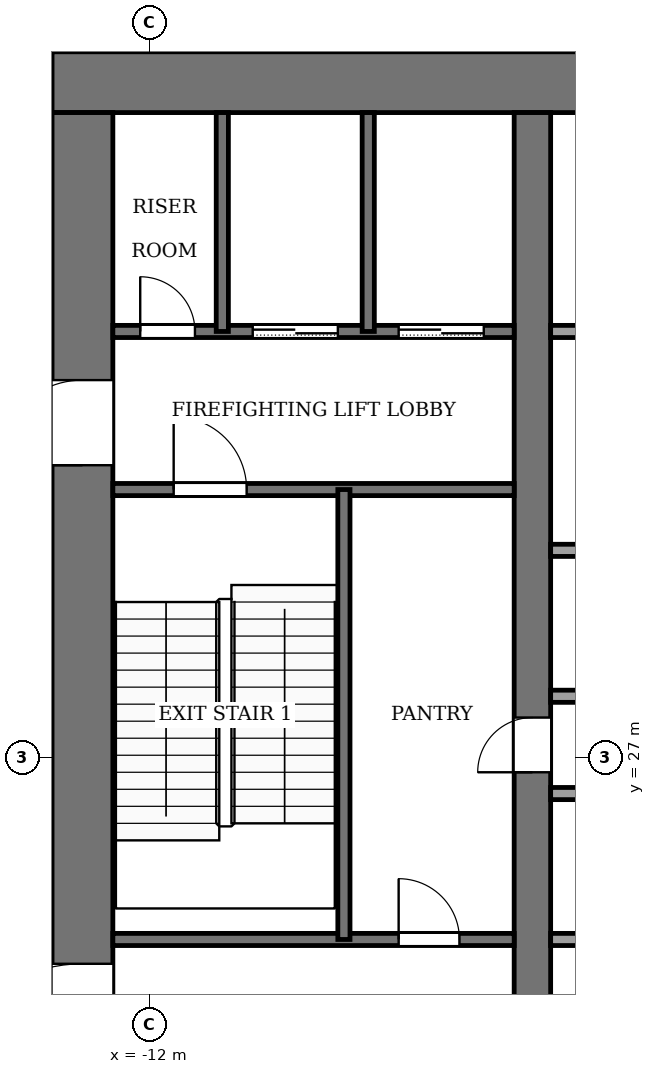
"""IFC4 building model, lengths in metres.
Left out: names, types, materials, properties, quantities, classifications, styles, units other than length and angle.
Written with IfcOpenShell. Run it as: python <this file> out.ifc"""

import sys

from ifc_helpers import new_model, si_unit, direction, frame, frame_2d, origin, place, context, subcontext, project, spatial, rectangle, extrude, element, fill, save


model = new_model("IFC4")
c1 = context("Model", 3, precision=1e-05, world=origin(), true_north=direction((0.0, 1.0)))
c2 = subcontext(c1, "Body", "Model", "MODEL_VIEW")
j1 = project(units=[si_unit("LENGTHUNIT", "METRE"), si_unit("PLANEANGLEUNIT", "RADIAN")], contexts=[c1])
p1 = place(None, origin())
s1 = spatial("IfcSite", under=j1, at=p1, CompositionType="ELEMENT")
p2 = place(p1, origin())
s2 = spatial("IfcBuilding", under=s1, at=p2, CompositionType="ELEMENT")
p3 = place(p2, frame((0.0, 0.0, 121.0)))
s3 = spatial("IfcBuildingStorey", under=s2, at=p3, CompositionType="ELEMENT", Elevation=121.0)
p4 = place(p3, frame((-13.6, 38.1, -0.13), z_axis=(0.0, 0.0, 1.0), x_axis=(1.0, 0.0, 0.0)))
e1 = element("IfcWall", 1, at=p4, inside=s3, PredefinedType="SHEAR", context=c2, shape_type="SweptSolid", body=[
    extrude(rectangle(XDim=27.2, YDim=1.0, at=frame_2d((13.6, 0.0))), origin(), (0.0, 0.0, 1.0), 5.0),
])
p5 = place(p3, frame((-13.1, 18.4, -0.13), z_axis=(0.0, 0.0, 1.0), x_axis=(0.0, 1.0, 0.0)))
e2 = element("IfcWall", 2, at=p5, inside=s3, PredefinedType="SHEAR", context=c2, shape_type="SweptSolid", body=[
    extrude(rectangle(XDim=19.2, YDim=1.0, at=frame_2d((9.6, 0.0))), origin(), (0.0, 0.0, 1.0), 5.0),
])
p6 = place(p5, frame((2.8, 0.0, 0.13)))
e3 = element("IfcOpeningElement", 3, at=p6, cuts=e2, PredefinedType="OPENING", context=c2, shape_type="SweptSolid", body=[
    extrude(rectangle(XDim=2.4, YDim=2.4, at=frame_2d((1.2, 1.2))), frame((0.0, 0.51, 0.0), z_axis=(0.0, -1.0, 0.0), x_axis=(1.0, 0.0, 0.0)), (0.0, 0.0, 1.0), 1.02),
])
p7 = place(p5, frame((13.4, 0.0, 0.13)))
e4 = element("IfcOpeningElement", 4, at=p7, cuts=e2, PredefinedType="OPENING", context=c2, shape_type="SweptSolid", body=[
    extrude(rectangle(XDim=1.4, YDim=2.2, at=frame_2d((0.7, 1.1))), frame((0.0, 0.51, 0.0), z_axis=(0.0, -1.0, 0.0), x_axis=(1.0, 0.0, 0.0)), (0.0, 0.0, 1.0), 1.02),
])
p8 = place(p3, frame((-5.7, 18.4, -0.13), z_axis=(0.0, 0.0, 1.0), x_axis=(0.0, 1.0, 0.0)))
e5 = element("IfcWall", 5, at=p8, inside=s3, PredefinedType="SHEAR", context=c2, shape_type="SweptSolid", body=[
    extrude(rectangle(XDim=19.2, YDim=0.6, at=frame_2d((9.6, 0.0))), origin(), (0.0, 0.0, 1.0), 5.0),
])
p9 = place(p8, frame((8.35, 0.0, 0.13)))
e6 = element("IfcOpeningElement", 6, at=p9, cuts=e5, PredefinedType="OPENING", context=c2, shape_type="SweptSolid", body=[
    extrude(rectangle(XDim=0.9, YDim=2.1, at=frame_2d((0.45, 1.05))), frame((0.0, 0.31, 0.0), z_axis=(0.0, -1.0, 0.0), x_axis=(1.0, 0.0, 0.0)), (0.0, 0.0, 1.0), 0.62),
])
p10 = place(p3, frame((-12.6, 24.0, 0.0), z_axis=(0.0, 0.0, 1.0), x_axis=(1.0, 0.0, 0.0)))
e7 = element("IfcWall", 7, at=p10, inside=s3, PredefinedType="PARTITIONING", context=c2, shape_type="SweptSolid", body=[
    extrude(rectangle(XDim=6.6, YDim=0.2, at=frame_2d((3.3, 0.0))), origin(), (0.0, 0.0, 1.0), 4.87),
])
p11 = place(p10, frame((4.7, 0.0, 0.0)))
e8 = element("IfcOpeningElement", 8, at=p11, cuts=e7, PredefinedType="OPENING", context=c2, shape_type="SweptSolid", body=[
    extrude(rectangle(XDim=1.0, YDim=2.1, at=frame_2d((0.5, 1.05))), frame((0.0, 0.11, 0.0), z_axis=(0.0, -1.0, 0.0), x_axis=(1.0, 0.0, 0.0)), (0.0, 0.0, 1.0), 0.22),
])
p12 = place(p3, frame((-5.4, 24.0, 0.0), z_axis=(0.0, 0.0, 1.0), x_axis=(1.0, 0.0, 0.0)))
e9 = element("IfcWall", 9, at=p12, inside=s3, PredefinedType="PARTITIONING", context=c2, shape_type="SweptSolid", body=[
    extrude(rectangle(XDim=10.8, YDim=0.2, at=frame_2d((5.4, 0.0))), origin(), (0.0, 0.0, 1.0), 4.87),
])
p13 = place(p12, frame((0.75, 0.0, 0.0)))
e10 = element("IfcOpeningElement", 10, at=p13, cuts=e9, PredefinedType="OPENING", context=c2, shape_type="SweptSolid", body=[
    extrude(rectangle(XDim=1.2, YDim=2.2, at=frame_2d((0.6, 1.1))), frame((0.0, 0.11, 0.0), z_axis=(0.0, -1.0, 0.0), x_axis=(1.0, 0.0, 0.0)), (0.0, 0.0, 1.0), 0.22),
])
p14 = place(p12, frame((3.45, 0.0, 0.0)))
e11 = element("IfcOpeningElement", 11, at=p14, cuts=e9, PredefinedType="OPENING", context=c2, shape_type="SweptSolid", body=[
    extrude(rectangle(XDim=1.2, YDim=2.2, at=frame_2d((0.6, 1.1))), frame((0.0, 0.11, 0.0), z_axis=(0.0, -1.0, 0.0), x_axis=(1.0, 0.0, 0.0)), (0.0, 0.0, 1.0), 0.22),
])
p15 = place(p12, frame((6.15, 0.0, 0.0)))
e12 = element("IfcOpeningElement", 12, at=p15, cuts=e9, PredefinedType="OPENING", context=c2, shape_type="SweptSolid", body=[
    extrude(rectangle(XDim=1.2, YDim=2.2, at=frame_2d((0.6, 1.1))), frame((0.0, 0.11, 0.0), z_axis=(0.0, -1.0, 0.0), x_axis=(1.0, 0.0, 0.0)), (0.0, 0.0, 1.0), 0.22),
])
p16 = place(p12, frame((8.85, 0.0, 0.0)))
e13 = element("IfcOpeningElement", 13, at=p16, cuts=e9, PredefinedType="OPENING", context=c2, shape_type="SweptSolid", body=[
    extrude(rectangle(XDim=1.2, YDim=2.2, at=frame_2d((0.6, 1.1))), frame((0.0, 0.11, 0.0), z_axis=(0.0, -1.0, 0.0), x_axis=(1.0, 0.0, 0.0)), (0.0, 0.0, 1.0), 0.22),
])
for number, where, z_axis, x_axis in (
    (14, (-5.4, 26.4, 0.0), (0.0, 0.0, 1.0), (1.0, 0.0, 0.0)),
    (15, (-5.4, 28.0, 0.0), (0.0, 0.0, 1.0), (1.0, 0.0, 0.0)),
    (16, (-5.4, 30.4, 0.0), (0.0, 0.0, 1.0), (1.0, 0.0, 0.0)),
):
    element("IfcWall", number, at=place(p3, frame(where, z_axis=z_axis, x_axis=x_axis)), inside=s3, PredefinedType="PARTITIONING", context=c2, shape_type="SweptSolid", body=[
        extrude(rectangle(XDim=10.8, YDim=0.2, at=frame_2d((5.4, 0.0))), origin(), (0.0, 0.0, 1.0), 4.87),
    ])
p17 = place(p3, frame((-12.6, 31.4, 0.0), z_axis=(0.0, 0.0, 1.0), x_axis=(1.0, 0.0, 0.0)))
e17 = element("IfcWall", 17, at=p17, inside=s3, PredefinedType="PARTITIONING", context=c2, shape_type="SweptSolid", body=[
    extrude(rectangle(XDim=6.6, YDim=0.2, at=frame_2d((3.3, 0.0))), origin(), (0.0, 0.0, 1.0), 4.87),
])
p18 = place(p17, frame((1.0, 0.0, 0.0)))
e18 = element("IfcOpeningElement", 18, at=p18, cuts=e17, PredefinedType="OPENING", context=c2, shape_type="SweptSolid", body=[
    extrude(rectangle(XDim=1.2, YDim=2.2, at=frame_2d((0.6, 1.1))), frame((0.0, 0.11, 0.0), z_axis=(0.0, -1.0, 0.0), x_axis=(1.0, 0.0, 0.0)), (0.0, 0.0, 1.0), 0.22),
])
p19 = place(p3, frame((-12.6, 34.0, 0.0), z_axis=(0.0, 0.0, 1.0), x_axis=(1.0, 0.0, 0.0)))
e19 = element("IfcWall", 19, at=p19, inside=s3, PredefinedType="PARTITIONING", context=c2, shape_type="SweptSolid", body=[
    extrude(rectangle(XDim=6.6, YDim=0.2, at=frame_2d((3.3, 0.0))), origin(), (0.0, 0.0, 1.0), 4.87),
])
p20 = place(p19, frame((4.7, 0.0, 0.0)))
e20 = element("IfcOpeningElement", 20, at=p20, cuts=e19, PredefinedType="OPENING", context=c2, shape_type="SweptSolid", body=[
    extrude(rectangle(XDim=1.4, YDim=2.2, at=frame_2d((0.7, 1.1))), frame((0.0, 0.11, 0.0), z_axis=(0.0, -1.0, 0.0), x_axis=(1.0, 0.0, 0.0)), (0.0, 0.0, 1.0), 0.22),
])
p21 = place(p19, frame((2.3, 0.0, 0.0)))
e21 = element("IfcOpeningElement", 21, at=p21, cuts=e19, PredefinedType="OPENING", context=c2, shape_type="SweptSolid", body=[
    extrude(rectangle(XDim=1.4, YDim=2.2, at=frame_2d((0.7, 1.1))), frame((0.0, 0.11, 0.0), z_axis=(0.0, -1.0, 0.0), x_axis=(1.0, 0.0, 0.0)), (0.0, 0.0, 1.0), 0.22),
])
p22 = place(p19, frame((0.45, 0.0, 0.0)))
e22 = element("IfcOpeningElement", 22, at=p22, cuts=e19, PredefinedType="OPENING", context=c2, shape_type="SweptSolid", body=[
    extrude(rectangle(XDim=0.9, YDim=2.1, at=frame_2d((0.45, 1.05))), frame((0.0, 0.11, 0.0), z_axis=(0.0, -1.0, 0.0), x_axis=(1.0, 0.0, 0.0)), (0.0, 0.0, 1.0), 0.22),
])
p23 = place(p3, frame((-5.4, 34.0, 0.0), z_axis=(0.0, 0.0, 1.0), x_axis=(1.0, 0.0, 0.0)))
e23 = element("IfcWall", 23, at=p23, inside=s3, PredefinedType="PARTITIONING", context=c2, shape_type="SweptSolid", body=[
    extrude(rectangle(XDim=10.8, YDim=0.2, at=frame_2d((5.4, 0.0))), origin(), (0.0, 0.0, 1.0), 4.87),
])
p24 = place(p23, frame((6.15, 0.0, 0.0)))
e24 = element("IfcOpeningElement", 24, at=p24, cuts=e23, PredefinedType="OPENING", context=c2, shape_type="SweptSolid", body=[
    extrude(rectangle(XDim=1.2, YDim=2.2, at=frame_2d((0.6, 1.1))), frame((0.0, 0.11, 0.0), z_axis=(0.0, -1.0, 0.0), x_axis=(1.0, 0.0, 0.0)), (0.0, 0.0, 1.0), 0.22),
])
p25 = place(p23, frame((8.95, 0.0, 0.0)))
e25 = element("IfcOpeningElement", 25, at=p25, cuts=e23, PredefinedType="OPENING", context=c2, shape_type="SweptSolid", body=[
    extrude(rectangle(XDim=1.0, YDim=2.1, at=frame_2d((0.5, 1.05))), frame((0.0, 0.11, 0.0), z_axis=(0.0, -1.0, 0.0), x_axis=(1.0, 0.0, 0.0)), (0.0, 0.0, 1.0), 0.22),
])
p26 = place(p3, frame((-10.8, 34.0, 0.0), z_axis=(0.0, 0.0, 1.0), x_axis=(0.0, 1.0, 0.0)))
e26 = element("IfcWall", 26, at=p26, inside=s3, PredefinedType="PARTITIONING", context=c2, shape_type="SweptSolid", body=[
    extrude(rectangle(XDim=3.6, YDim=0.2, at=frame_2d((1.8, 0.0))), origin(), (0.0, 0.0, 1.0), 4.87),
])
p27 = place(p3, frame((-8.8, 24.0, 0.0), z_axis=(0.0, 0.0, 1.0), x_axis=(0.0, 1.0, 0.0)))
e27 = element("IfcWall", 27, at=p27, inside=s3, PredefinedType="PARTITIONING", context=c2, shape_type="SweptSolid", body=[
    extrude(rectangle(XDim=7.4, YDim=0.2, at=frame_2d((3.7, 0.0))), origin(), (0.0, 0.0, 1.0), 4.87),
])
p28 = place(p3, frame((-8.4, 34.0, 0.0), z_axis=(0.0, 0.0, 1.0), x_axis=(0.0, 1.0, 0.0)))
e28 = element("IfcWall", 28, at=p28, inside=s3, PredefinedType="PARTITIONING", context=c2, shape_type="SweptSolid", body=[
    extrude(rectangle(XDim=3.6, YDim=0.2, at=frame_2d((1.8, 0.0))), origin(), (0.0, 0.0, 1.0), 4.87),
])
p29 = place(p20, origin())
e29 = element("IfcDoor", 29, at=p29, inside=s3, OperationType="SLIDING_TO_LEFT", PredefinedType="DOOR", context=c2, shape_type="SweptSolid", body=[
    extrude(rectangle(XDim=1.4, YDim=2.2, at=frame_2d((0.7, 1.1))), frame((0.0, 0.025, 0.0), z_axis=(0.0, -1.0, 0.0), x_axis=(1.0, 0.0, 0.0)), (0.0, 0.0, 1.0), 0.05),
])
fill(e20, e29)
p30 = place(p21, origin())
e30 = element("IfcDoor", 30, at=p30, inside=s3, OperationType="SLIDING_TO_LEFT", PredefinedType="DOOR", context=c2, shape_type="SweptSolid", body=[
    extrude(rectangle(XDim=1.4, YDim=2.2, at=frame_2d((0.7, 1.1))), frame((0.0, 0.025, 0.0), z_axis=(0.0, -1.0, 0.0), x_axis=(1.0, 0.0, 0.0)), (0.0, 0.0, 1.0), 0.05),
])
fill(e21, e30)
p31 = place(p22, origin())
e31 = element("IfcDoor", 31, at=p31, inside=s3, OperationType="SINGLE_SWING_RIGHT", PredefinedType="DOOR", context=c2, shape_type="SweptSolid", body=[
    extrude(rectangle(XDim=0.9, YDim=2.1, at=frame_2d((0.45, 1.05))), frame((0.0, 0.025, 0.0), z_axis=(0.0, -1.0, 0.0), x_axis=(1.0, 0.0, 0.0)), (0.0, 0.0, 1.0), 0.05),
])
fill(e22, e31)
p32 = place(p11, origin())
e32 = element("IfcDoor", 32, at=p32, inside=s3, OperationType="SINGLE_SWING_LEFT", PredefinedType="DOOR", context=c2, shape_type="SweptSolid", body=[
    extrude(rectangle(XDim=1.0, YDim=2.1, at=frame_2d((0.5, 1.05))), frame((0.0, 0.025, 0.0), z_axis=(0.0, -1.0, 0.0), x_axis=(1.0, 0.0, 0.0)), (0.0, 0.0, 1.0), 0.05),
])
fill(e8, e32)
p33 = place(p9, origin())
e33 = element("IfcDoor", 33, at=p33, inside=s3, OperationType="SINGLE_SWING_RIGHT", PredefinedType="DOOR", context=c2, shape_type="SweptSolid", body=[
    extrude(rectangle(XDim=0.9, YDim=2.1, at=frame_2d((0.45, 1.05))), frame((0.0, 0.025, 0.0), z_axis=(0.0, -1.0, 0.0), x_axis=(1.0, 0.0, 0.0)), (0.0, 0.0, 1.0), 0.05),
])
fill(e6, e33)
p34 = place(p18, origin())
e34 = element("IfcDoor", 34, at=p34, inside=s3, OperationType="SINGLE_SWING_RIGHT", PredefinedType="DOOR", context=c2, shape_type="SweptSolid", body=[
    extrude(rectangle(XDim=1.2, YDim=2.2, at=frame_2d((0.6, 1.1))), frame((0.0, 0.025, 0.0), z_axis=(0.0, -1.0, 0.0), x_axis=(1.0, 0.0, 0.0)), (0.0, 0.0, 1.0), 0.05),
])
fill(e18, e34)
p35 = place(p6, origin())
e35 = element("IfcDoor", 35, at=p35, inside=s3, OperationType="DOUBLE_DOOR_SINGLE_SWING", PredefinedType="DOOR", context=c2, shape_type="SweptSolid", body=[
    extrude(rectangle(XDim=2.4, YDim=2.4, at=frame_2d((1.2, 1.2))), frame((0.0, 0.025, 0.0), z_axis=(0.0, -1.0, 0.0), x_axis=(1.0, 0.0, 0.0)), (0.0, 0.0, 1.0), 0.05),
])
fill(e3, e35)
p36 = place(p7, origin())
e36 = element("IfcDoor", 36, at=p36, inside=s3, OperationType="SINGLE_SWING_RIGHT", PredefinedType="DOOR", context=c2, shape_type="SweptSolid", body=[
    extrude(rectangle(XDim=1.4, YDim=2.2, at=frame_2d((0.7, 1.1))), frame((0.0, 0.025, 0.0), z_axis=(0.0, -1.0, 0.0), x_axis=(1.0, 0.0, 0.0)), (0.0, 0.0, 1.0), 0.05),
])
fill(e4, e36)
save(model, sys.argv[1])
